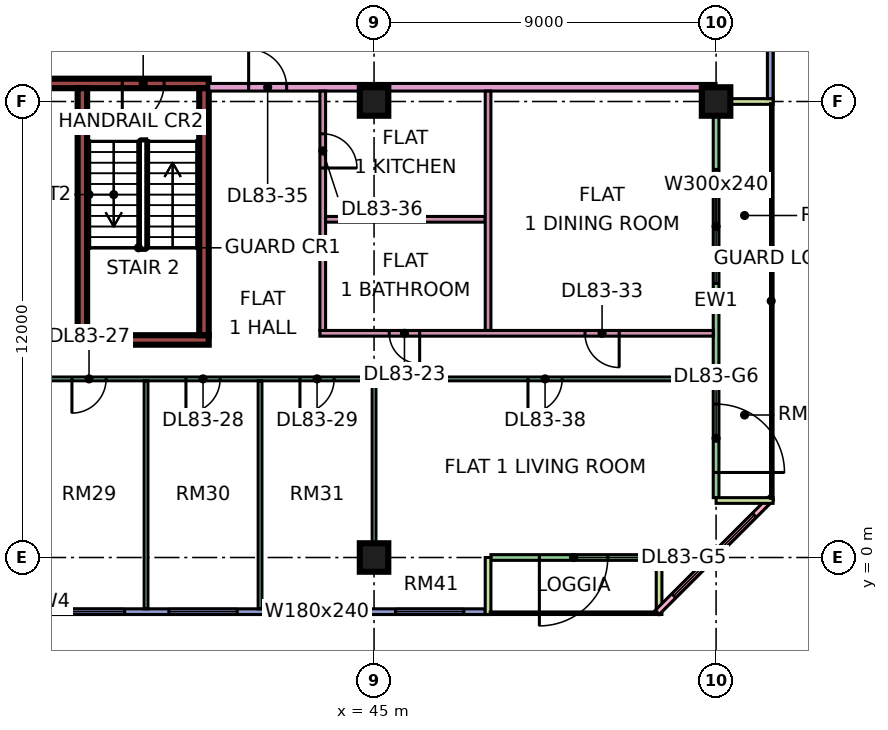
"""IFC4 building model, lengths in metres.
Left out: names, types, materials, properties, quantities, classifications, styles, units other than length and angle.
Written with IfcOpenShell. Run it as: python <this file> out.ifc"""

import sys

from ifc_helpers import new_model, si_unit, direction, frame, frame_2d, origin, origin_2d, place, context, subcontext, project, spatial, rectangle, extrude, element, fill, save


model = new_model("IFC4")
c1 = context("Model", 3, precision=1e-05, world=origin(), true_north=direction((0.0, 1.0)))
c2 = subcontext(c1, "Body", "Model", "MODEL_VIEW")
j1 = project(units=[si_unit("LENGTHUNIT", "METRE"), si_unit("PLANEANGLEUNIT", "RADIAN")], contexts=[c1])
p1 = place(None, origin())
s1 = spatial("IfcSite", under=j1, at=p1, CompositionType="ELEMENT")
p2 = place(p1, origin())
s2 = spatial("IfcBuilding", under=s1, at=p2, CompositionType="ELEMENT")
p3 = place(p2, frame((0.0, 0.0, 357.65)))
s3 = spatial("IfcBuildingStorey", under=s2, at=p3, CompositionType="ELEMENT", Elevation=357.65)
for number, where, z_axis, x_axis in (
    (1, (45.0, 0.0, 0.0), (0.0, 0.0, 1.0), (1.0, 0.0, 0.0)),
    (2, (45.0, 12.0, 0.0), (0.0, 0.0, 1.0), (1.0, 0.0, 0.0)),
    (3, (54.0, 12.0, 0.0), (0.0, 0.0, 1.0), (1.0, 0.0, 0.0)),
):
    element("IfcColumn", number, at=place(p3, frame(where, z_axis=z_axis, x_axis=x_axis)), inside=s3, PredefinedType="COLUMN", context=c2, shape_type="SweptSolid", body=[
        extrude(rectangle(XDim=0.75, YDim=0.75, at=origin_2d()), origin(), (0.0, 0.0, 1.0), 3.75),
    ])
p4 = place(p3, frame((37.2, 5.725, 0.0), z_axis=(0.0, 0.0, 1.0), x_axis=(1.0, 0.0, 0.0)))
e4 = element("IfcWall", 4, at=p4, inside=s3, PredefinedType="SHEAR", context=c2, shape_type="SweptSolid", body=[
    extrude(rectangle(XDim=3.45, YDim=0.25, at=frame_2d((1.725, 0.0))), origin(), (0.0, 0.0, 1.0), 3.75),
])
p5 = place(p3, frame((36.375, 12.475, 0.0), z_axis=(0.0, 0.0, 1.0), x_axis=(1.0, 0.0, 0.0)))
e5 = element("IfcWall", 5, at=p5, inside=s3, PredefinedType="SHEAR", context=c2, shape_type="SweptSolid", body=[
    extrude(rectangle(XDim=4.275, YDim=0.25, at=frame_2d((2.137, 0.0))), origin(), (0.0, 0.0, 1.0), 3.75),
])
p6 = place(p5, frame((2.0, 0.0, 0.0)))
e6 = element("IfcOpeningElement", 6, at=p6, cuts=e5, PredefinedType="OPENING", context=c2, shape_type="SweptSolid", body=[
    extrude(rectangle(XDim=1.1, YDim=2.2, at=frame_2d((0.55, 1.1))), frame((0.0, 0.135, 0.0), z_axis=(0.0, -1.0, 0.0), x_axis=(1.0, 0.0, 0.0)), (0.0, 0.0, 1.0), 0.27),
])
for number, where, z_axis, x_axis in (
    (7, (37.325, 5.85, 0.0), (0.0, 0.0, 1.0), (0.0, 1.0, 0.0)),
    (8, (40.525, 5.85, 0.0), (0.0, 0.0, 1.0), (0.0, 1.0, 0.0)),
):
    element("IfcWall", number, at=place(p3, frame(where, z_axis=z_axis, x_axis=x_axis)), inside=s3, PredefinedType="SHEAR", context=c2, shape_type="SweptSolid", body=[
        extrude(rectangle(XDim=6.5, YDim=0.25, at=frame_2d((3.25, 0.0))), origin(), (0.0, 0.0, 1.0), 3.75),
    ])
p7 = place(p3, frame((36.075, -1.425, 0.0), z_axis=(0.0, 0.0, 1.0), x_axis=(1.0, 0.0, 0.0)))
e9 = element("IfcWall", 9, at=p7, inside=s3, PredefinedType="SOLIDWALL", context=c2, shape_type="SweptSolid", body=[
    extrude(rectangle(XDim=11.85, YDim=0.15, at=frame_2d((5.925, 0.0))), origin(), (0.0, 0.0, 1.0), 3.35),
])
p8 = place(p7, frame((0.562, 0.0, 0.45)))
e10 = element("IfcOpeningElement", 10, at=p8, cuts=e9, PredefinedType="OPENING", context=c2, shape_type="SweptSolid", body=[
    extrude(rectangle(XDim=1.8, YDim=2.4, at=frame_2d((0.9, 1.2))), frame((0.0, 0.085, 0.0), z_axis=(0.0, -1.0, 0.0), x_axis=(1.0, 0.0, 0.0)), (0.0, 0.0, 1.0), 0.17),
])
p9 = place(p7, frame((3.525, 0.0, 0.45)))
e11 = element("IfcOpeningElement", 11, at=p9, cuts=e9, PredefinedType="OPENING", context=c2, shape_type="SweptSolid", body=[
    extrude(rectangle(XDim=1.8, YDim=2.4, at=frame_2d((0.9, 1.2))), frame((0.0, 0.085, 0.0), z_axis=(0.0, -1.0, 0.0), x_axis=(1.0, 0.0, 0.0)), (0.0, 0.0, 1.0), 0.17),
])
p10 = place(p7, frame((6.525, 0.0, 0.45)))
e12 = element("IfcOpeningElement", 12, at=p10, cuts=e9, PredefinedType="OPENING", context=c2, shape_type="SweptSolid", body=[
    extrude(rectangle(XDim=1.8, YDim=2.4, at=frame_2d((0.9, 1.2))), frame((0.0, 0.085, 0.0), z_axis=(0.0, -1.0, 0.0), x_axis=(1.0, 0.0, 0.0)), (0.0, 0.0, 1.0), 0.17),
])
p11 = place(p7, frame((9.488, 0.0, 0.45)))
e13 = element("IfcOpeningElement", 13, at=p11, cuts=e9, PredefinedType="OPENING", context=c2, shape_type="SweptSolid", body=[
    extrude(rectangle(XDim=1.8, YDim=2.4, at=frame_2d((0.9, 1.2))), frame((0.0, 0.085, 0.0), z_axis=(0.0, -1.0, 0.0), x_axis=(1.0, 0.0, 0.0)), (0.0, 0.0, 1.0), 0.17),
])
p12 = place(p3, frame((48.075, 0.0, 0.0), z_axis=(0.0, 0.0, 1.0), x_axis=(1.0, 0.0, 0.0)))
e14 = element("IfcWall", 14, at=p12, inside=s3, PredefinedType="SOLIDWALL", context=c2, shape_type="SweptSolid", body=[
    extrude(rectangle(XDim=4.35, YDim=0.15, at=frame_2d((2.175, 0.0))), origin(), (0.0, 0.0, 1.0), 3.35),
])
p13 = place(p12, frame((1.275, 0.0, 0.0)))
e15 = element("IfcOpeningElement", 15, at=p13, cuts=e14, PredefinedType="OPENING", context=c2, shape_type="SweptSolid", body=[
    extrude(rectangle(XDim=1.8, YDim=2.4, at=frame_2d((0.9, 1.2))), frame((0.0, 0.085, 0.0), z_axis=(0.0, -1.0, 0.0), x_axis=(1.0, 0.0, 0.0)), (0.0, 0.0, 1.0), 0.17),
])
for number, where, z_axis, x_axis in (
    (16, (48.0, -1.5, 0.0), (0.0, 0.0, 1.0), (0.0, 1.0, 0.0)),
    (17, (52.5, -1.5, 0.0), (0.0, 0.0, 1.0), (0.0, 1.0, 0.0)),
):
    element("IfcWall", number, at=place(p3, frame(where, z_axis=z_axis, x_axis=x_axis)), inside=s3, PredefinedType="SOLIDWALL", context=c2, shape_type="SweptSolid", body=[
        extrude(rectangle(XDim=1.5, YDim=0.15, at=frame_2d((0.75, 0.0))), origin(), (0.0, 0.0, 1.0), 3.35),
    ])
p14 = place(p3, frame((52.447, -1.447, 0.0), z_axis=(0.0, 0.0, 1.0), x_axis=(0.707106781187, 0.707106781187, 0.0)))
e18 = element("IfcWall", 18, at=p14, inside=s3, PredefinedType="SOLIDWALL", context=c2, shape_type="SweptSolid", body=[
    extrude(rectangle(XDim=4.243, YDim=0.15, at=frame_2d((2.121, 0.0))), origin(), (0.0, 0.0, 1.0), 3.35),
])
p15 = place(p14, frame((0.621, 0.0, 0.45)))
e19 = element("IfcOpeningElement", 19, at=p15, cuts=e18, PredefinedType="OPENING", context=c2, shape_type="SweptSolid", body=[
    extrude(rectangle(XDim=3.0, YDim=2.4, at=frame_2d((1.5, 1.2))), frame((0.0, 0.085, 0.0), z_axis=(0.0, -1.0, 0.0), x_axis=(1.0, 0.0, 0.0)), (0.0, 0.0, 1.0), 0.17),
])
p16 = place(p3, frame((54.0, 1.575, 0.0), z_axis=(0.0, 0.0, 1.0), x_axis=(0.0, 1.0, 0.0)))
e20 = element("IfcWall", 20, at=p16, inside=s3, PredefinedType="SOLIDWALL", context=c2, shape_type="SweptSolid", body=[
    extrude(rectangle(XDim=10.35, YDim=0.15, at=frame_2d((5.175, 0.0))), origin(), (0.0, 0.0, 1.0), 3.35),
])
p17 = place(p16, frame((0.663, 0.0, 0.0)))
e21 = element("IfcOpeningElement", 21, at=p17, cuts=e20, PredefinedType="OPENING", context=c2, shape_type="SweptSolid", body=[
    extrude(rectangle(XDim=1.8, YDim=2.4, at=frame_2d((0.9, 1.2))), frame((0.0, 0.085, 0.0), z_axis=(0.0, -1.0, 0.0), x_axis=(1.0, 0.0, 0.0)), (0.0, 0.0, 1.0), 0.17),
])
p18 = place(p16, frame((5.637, 0.0, 0.45)))
e22 = element("IfcOpeningElement", 22, at=p18, cuts=e20, PredefinedType="OPENING", context=c2, shape_type="SweptSolid", body=[
    extrude(rectangle(XDim=3.0, YDim=2.4, at=frame_2d((1.5, 1.2))), frame((0.0, 0.085, 0.0), z_axis=(0.0, -1.0, 0.0), x_axis=(1.0, 0.0, 0.0)), (0.0, 0.0, 1.0), 0.17),
])
for number, where, z_axis, x_axis in (
    (23, (55.5, 1.5, 0.0), (0.0, 0.0, 1.0), (-1.0, 0.0, 0.0)),
    (24, (55.5, 12.0, 0.0), (0.0, 0.0, 1.0), (-1.0, 0.0, 0.0)),
):
    element("IfcWall", number, at=place(p3, frame(where, z_axis=z_axis, x_axis=x_axis)), inside=s3, PredefinedType="SOLIDWALL", context=c2, shape_type="SweptSolid", body=[
        extrude(rectangle(XDim=1.5, YDim=0.15, at=frame_2d((0.75, 0.0))), origin(), (0.0, 0.0, 1.0), 3.35),
    ])
p19 = place(p3, frame((55.425, 12.075, 0.0), z_axis=(0.0, 0.0, 1.0), x_axis=(0.0, 1.0, 0.0)))
e25 = element("IfcWall", 25, at=p19, inside=s3, PredefinedType="SOLIDWALL", context=c2, shape_type="SweptSolid", body=[
    extrude(rectangle(XDim=10.425, YDim=0.15, at=frame_2d((5.212, 0.0))), origin(), (0.0, 0.0, 1.0), 3.35),
])
p20 = place(p19, frame((4.575, 0.0, 0.45)))
e26 = element("IfcOpeningElement", 26, at=p20, cuts=e25, PredefinedType="OPENING", context=c2, shape_type="SweptSolid", body=[
    extrude(rectangle(XDim=4.8, YDim=2.4, at=frame_2d((2.4, 1.2))), frame((0.0, 0.085, 0.0), z_axis=(0.0, -1.0, 0.0), x_axis=(1.0, 0.0, 0.0)), (0.0, 0.0, 1.0), 0.17),
])
p21 = place(p3, frame((33.05, 4.7, 0.0), z_axis=(0.0, 0.0, 1.0), x_axis=(1.0, 0.0, 0.0)))
e27 = element("IfcWall", 27, at=p21, inside=s3, PredefinedType="PARTITIONING", context=c2, shape_type="SweptSolid", body=[
    extrude(rectangle(XDim=20.876, YDim=0.1, at=frame_2d((10.438, 0.0))), origin(), (0.0, 0.0, 1.0), 3.35),
])
p22 = place(p21, frame((1.0, 0.0, 0.0)))
e28 = element("IfcOpeningElement", 28, at=p22, cuts=e27, PredefinedType="OPENING", context=c2, shape_type="SweptSolid", body=[
    extrude(rectangle(XDim=0.9, YDim=2.1, at=frame_2d((0.45, 1.05))), frame((0.0, 0.06, 0.0), z_axis=(0.0, -1.0, 0.0), x_axis=(1.0, 0.0, 0.0)), (0.0, 0.0, 1.0), 0.12),
])
p23 = place(p21, frame((4.0, 0.0, 0.0)))
e29 = element("IfcOpeningElement", 29, at=p23, cuts=e27, PredefinedType="OPENING", context=c2, shape_type="SweptSolid", body=[
    extrude(rectangle(XDim=0.9, YDim=2.1, at=frame_2d((0.45, 1.05))), frame((0.0, 0.06, 0.0), z_axis=(0.0, -1.0, 0.0), x_axis=(1.0, 0.0, 0.0)), (0.0, 0.0, 1.0), 0.12),
])
p24 = place(p21, frame((7.0, 0.0, 0.0)))
e30 = element("IfcOpeningElement", 30, at=p24, cuts=e27, PredefinedType="OPENING", context=c2, shape_type="SweptSolid", body=[
    extrude(rectangle(XDim=0.9, YDim=2.1, at=frame_2d((0.45, 1.05))), frame((0.0, 0.06, 0.0), z_axis=(0.0, -1.0, 0.0), x_axis=(1.0, 0.0, 0.0)), (0.0, 0.0, 1.0), 0.12),
])
p25 = place(p21, frame((10.0, 0.0, 0.0)))
e31 = element("IfcOpeningElement", 31, at=p25, cuts=e27, PredefinedType="OPENING", context=c2, shape_type="SweptSolid", body=[
    extrude(rectangle(XDim=0.9, YDim=2.1, at=frame_2d((0.45, 1.05))), frame((0.0, 0.06, 0.0), z_axis=(0.0, -1.0, 0.0), x_axis=(1.0, 0.0, 0.0)), (0.0, 0.0, 1.0), 0.12),
])
p26 = place(p21, frame((16.0, 0.0, 0.0)))
e32 = element("IfcOpeningElement", 32, at=p26, cuts=e27, PredefinedType="OPENING", context=c2, shape_type="SweptSolid", body=[
    extrude(rectangle(XDim=0.9, YDim=2.1, at=frame_2d((0.45, 1.05))), frame((0.0, 0.06, 0.0), z_axis=(0.0, -1.0, 0.0), x_axis=(1.0, 0.0, 0.0)), (0.0, 0.0, 1.0), 0.12),
])
p27 = place(p3, frame((39.0, -1.351, 0.0), z_axis=(0.0, 0.0, 1.0), x_axis=(0.0, 1.0, 0.0)))
e33 = element("IfcWall", 33, at=p27, inside=s3, PredefinedType="PARTITIONING", context=c2, shape_type="SweptSolid", body=[
    extrude(rectangle(XDim=6.001, YDim=0.1, at=frame_2d((3.0, 0.0))), origin(), (0.0, 0.0, 1.0), 3.35),
])
p28 = place(p3, frame((40.65, 12.375, 0.0), z_axis=(0.0, 0.0, 1.0), x_axis=(1.0, 0.0, 0.0)))
e34 = element("IfcWall", 34, at=p28, inside=s3, PredefinedType="PARTITIONING", context=c2, shape_type="SweptSolid", body=[
    extrude(rectangle(XDim=13.35, YDim=0.2, at=frame_2d((6.675, 0.0))), origin(), (0.0, 0.0, 1.0), 3.35),
])
p29 = place(p28, frame((1.05, 0.0, 0.0)))
e35 = element("IfcOpeningElement", 35, at=p29, cuts=e34, PredefinedType="OPENING", context=c2, shape_type="SweptSolid", body=[
    extrude(rectangle(XDim=1.0, YDim=2.1, at=frame_2d((0.5, 1.05))), frame((0.0, 0.11, 0.0), z_axis=(0.0, -1.0, 0.0), x_axis=(1.0, 0.0, 0.0)), (0.0, 0.0, 1.0), 0.22),
])
p30 = place(p3, frame((42.0, -1.351, 0.0), z_axis=(0.0, 0.0, 1.0), x_axis=(0.0, 1.0, 0.0)))
e36 = element("IfcWall", 36, at=p30, inside=s3, PredefinedType="PARTITIONING", context=c2, shape_type="SweptSolid", body=[
    extrude(rectangle(XDim=6.001, YDim=0.1, at=frame_2d((3.0, 0.0))), origin(), (0.0, 0.0, 1.0), 3.35),
])
p31 = place(p3, frame((43.575, 5.9, 0.0), z_axis=(0.0, 0.0, 1.0), x_axis=(1.0, 0.0, 0.0)))
e37 = element("IfcWall", 37, at=p31, inside=s3, PredefinedType="PARTITIONING", context=c2, shape_type="SweptSolid", body=[
    extrude(rectangle(XDim=10.351, YDim=0.15, at=frame_2d((5.176, 0.0))), origin(), (0.0, 0.0, 1.0), 3.35),
])
p32 = place(p31, frame((1.825, 0.0, 0.0)))
e38 = element("IfcOpeningElement", 38, at=p32, cuts=e37, PredefinedType="OPENING", context=c2, shape_type="SweptSolid", body=[
    extrude(rectangle(XDim=0.8, YDim=2.1, at=frame_2d((0.4, 1.05))), frame((0.0, 0.085, 0.0), z_axis=(0.0, -1.0, 0.0), x_axis=(1.0, 0.0, 0.0)), (0.0, 0.0, 1.0), 0.17),
])
p33 = place(p31, frame((6.975, 0.0, 0.0)))
e39 = element("IfcOpeningElement", 39, at=p33, cuts=e37, PredefinedType="OPENING", context=c2, shape_type="SweptSolid", body=[
    extrude(rectangle(XDim=0.9, YDim=2.1, at=frame_2d((0.45, 1.05))), frame((0.0, 0.085, 0.0), z_axis=(0.0, -1.0, 0.0), x_axis=(1.0, 0.0, 0.0)), (0.0, 0.0, 1.0), 0.17),
])
p34 = place(p3, frame((43.65, 5.975, 0.0), z_axis=(0.0, 0.0, 1.0), x_axis=(0.0, 1.0, 0.0)))
e40 = element("IfcWall", 40, at=p34, inside=s3, PredefinedType="PARTITIONING", context=c2, shape_type="SweptSolid", body=[
    extrude(rectangle(XDim=6.3, YDim=0.15, at=frame_2d((3.15, 0.0))), origin(), (0.0, 0.0, 1.0), 3.35),
])
p35 = place(p34, frame((4.275, 0.0, 0.0)))
e41 = element("IfcOpeningElement", 41, at=p35, cuts=e40, PredefinedType="OPENING", context=c2, shape_type="SweptSolid", body=[
    extrude(rectangle(XDim=0.9, YDim=2.1, at=frame_2d((0.45, 1.05))), frame((0.0, 0.085, 0.0), z_axis=(0.0, -1.0, 0.0), x_axis=(1.0, 0.0, 0.0)), (0.0, 0.0, 1.0), 0.17),
])
p36 = place(p3, frame((43.725, 8.9, 0.0), z_axis=(0.0, 0.0, 1.0), x_axis=(1.0, 0.0, 0.0)))
e42 = element("IfcWall", 42, at=p36, inside=s3, PredefinedType="PARTITIONING", context=c2, shape_type="SweptSolid", body=[
    extrude(rectangle(XDim=4.2, YDim=0.15, at=frame_2d((2.1, 0.0))), origin(), (0.0, 0.0, 1.0), 3.35),
])
p37 = place(p3, frame((45.0, 0.0, 0.0), z_axis=(0.0, 0.0, 1.0), x_axis=(0.0, 1.0, 0.0)))
e43 = element("IfcWall", 43, at=p37, inside=s3, PredefinedType="PARTITIONING", context=c2, shape_type="SweptSolid", body=[
    extrude(rectangle(XDim=4.65, YDim=0.1, at=frame_2d((2.325, 0.0))), origin(), (0.0, 0.0, 1.0), 3.35),
])
p38 = place(p3, frame((48.0, 5.975, 0.0), z_axis=(0.0, 0.0, 1.0), x_axis=(0.0, 1.0, 0.0)))
e44 = element("IfcWall", 44, at=p38, inside=s3, PredefinedType="PARTITIONING", context=c2, shape_type="SweptSolid", body=[
    extrude(rectangle(XDim=6.3, YDim=0.15, at=frame_2d((3.15, 0.0))), origin(), (0.0, 0.0, 1.0), 3.35),
])
p39 = place(p8, origin())
e45 = element("IfcWindow", 45, at=p39, inside=s3, PartitioningType="SINGLE_PANEL", PredefinedType="WINDOW", context=c2, shape_type="SweptSolid", body=[
    extrude(rectangle(XDim=1.8, YDim=2.4, at=frame_2d((0.9, 1.2))), frame((0.0, 0.03, 0.0), z_axis=(0.0, -1.0, 0.0), x_axis=(1.0, 0.0, 0.0)), (0.0, 0.0, 1.0), 0.06),
])
fill(e10, e45)
p40 = place(p9, origin())
e46 = element("IfcWindow", 46, at=p40, inside=s3, PartitioningType="SINGLE_PANEL", PredefinedType="WINDOW", context=c2, shape_type="SweptSolid", body=[
    extrude(rectangle(XDim=1.8, YDim=2.4, at=frame_2d((0.9, 1.2))), frame((0.0, 0.03, 0.0), z_axis=(0.0, -1.0, 0.0), x_axis=(1.0, 0.0, 0.0)), (0.0, 0.0, 1.0), 0.06),
])
fill(e11, e46)
p41 = place(p10, origin())
e47 = element("IfcWindow", 47, at=p41, inside=s3, PartitioningType="SINGLE_PANEL", PredefinedType="WINDOW", context=c2, shape_type="SweptSolid", body=[
    extrude(rectangle(XDim=1.8, YDim=2.4, at=frame_2d((0.9, 1.2))), frame((0.0, 0.03, 0.0), z_axis=(0.0, -1.0, 0.0), x_axis=(1.0, 0.0, 0.0)), (0.0, 0.0, 1.0), 0.06),
])
fill(e12, e47)
p42 = place(p11, origin())
e48 = element("IfcWindow", 48, at=p42, inside=s3, PartitioningType="SINGLE_PANEL", PredefinedType="WINDOW", context=c2, shape_type="SweptSolid", body=[
    extrude(rectangle(XDim=1.8, YDim=2.4, at=frame_2d((0.9, 1.2))), frame((0.0, 0.03, 0.0), z_axis=(0.0, -1.0, 0.0), x_axis=(1.0, 0.0, 0.0)), (0.0, 0.0, 1.0), 0.06),
])
fill(e13, e48)
p43 = place(p13, frame((1.8, 0.0, 0.0), z_axis=(0.0, 0.0, 1.0), x_axis=(-1.0, 0.0, 0.0)))
e49 = element("IfcDoor", 49, at=p43, inside=s3, OperationType="DOUBLE_DOOR_SINGLE_SWING", PredefinedType="DOOR", context=c2, shape_type="SweptSolid", body=[
    extrude(rectangle(XDim=1.8, YDim=2.4, at=frame_2d((0.9, 1.2))), frame((0.0, 0.025, 0.0), z_axis=(0.0, -1.0, 0.0), x_axis=(1.0, 0.0, 0.0)), (0.0, 0.0, 1.0), 0.05),
])
fill(e15, e49)
p44 = place(p15, origin())
e50 = element("IfcWindow", 50, at=p44, inside=s3, PartitioningType="SINGLE_PANEL", PredefinedType="WINDOW", context=c2, shape_type="SweptSolid", body=[
    extrude(rectangle(XDim=3.0, YDim=2.4, at=frame_2d((1.5, 1.2))), frame((0.0, 0.03, 0.0), z_axis=(0.0, -1.0, 0.0), x_axis=(1.0, 0.0, 0.0)), (0.0, 0.0, 1.0), 0.06),
])
fill(e19, e50)
p45 = place(p17, frame((1.8, 0.0, 0.0), z_axis=(0.0, 0.0, 1.0), x_axis=(-1.0, 0.0, 0.0)))
e51 = element("IfcDoor", 51, at=p45, inside=s3, OperationType="DOUBLE_DOOR_SINGLE_SWING", PredefinedType="DOOR", context=c2, shape_type="SweptSolid", body=[
    extrude(rectangle(XDim=1.8, YDim=2.4, at=frame_2d((0.9, 1.2))), frame((0.0, 0.025, 0.0), z_axis=(0.0, -1.0, 0.0), x_axis=(1.0, 0.0, 0.0)), (0.0, 0.0, 1.0), 0.05),
])
fill(e21, e51)
p46 = place(p18, origin())
e52 = element("IfcWindow", 52, at=p46, inside=s3, PartitioningType="SINGLE_PANEL", PredefinedType="WINDOW", context=c2, shape_type="SweptSolid", body=[
    extrude(rectangle(XDim=3.0, YDim=2.4, at=frame_2d((1.5, 1.2))), frame((0.0, 0.03, 0.0), z_axis=(0.0, -1.0, 0.0), x_axis=(1.0, 0.0, 0.0)), (0.0, 0.0, 1.0), 0.06),
])
fill(e22, e52)
p47 = place(p6, frame((1.1, 0.0, 0.0), z_axis=(0.0, 0.0, 1.0), x_axis=(-1.0, 0.0, 0.0)))
e53 = element("IfcDoor", 53, at=p47, inside=s3, OperationType="SINGLE_SWING_LEFT", PredefinedType="DOOR", context=c2, shape_type="SweptSolid", body=[
    extrude(rectangle(XDim=1.1, YDim=2.2, at=frame_2d((0.55, 1.1))), frame((0.0, 0.025, 0.0), z_axis=(0.0, -1.0, 0.0), x_axis=(1.0, 0.0, 0.0)), (0.0, 0.0, 1.0), 0.05),
])
fill(e6, e53)
p48 = place(p32, origin())
e54 = element("IfcDoor", 54, at=p48, inside=s3, OperationType="SINGLE_SWING_RIGHT", PredefinedType="DOOR", context=c2, shape_type="SweptSolid", body=[
    extrude(rectangle(XDim=0.8, YDim=2.1, at=frame_2d((0.4, 1.05))), frame((0.0, 0.025, 0.0), z_axis=(0.0, -1.0, 0.0), x_axis=(1.0, 0.0, 0.0)), (0.0, 0.0, 1.0), 0.05),
])
fill(e38, e54)
p49 = place(p23, frame((0.9, 0.0, 0.0), z_axis=(0.0, 0.0, 1.0), x_axis=(-1.0, 0.0, 0.0)))
e55 = element("IfcDoor", 55, at=p49, inside=s3, OperationType="SINGLE_SWING_LEFT", PredefinedType="DOOR", context=c2, shape_type="SweptSolid", body=[
    extrude(rectangle(XDim=0.9, YDim=2.1, at=frame_2d((0.45, 1.05))), frame((0.0, 0.025, 0.0), z_axis=(0.0, -1.0, 0.0), x_axis=(1.0, 0.0, 0.0)), (0.0, 0.0, 1.0), 0.05),
])
fill(e29, e55)
p50 = place(p24, frame((0.9, 0.0, 0.0), z_axis=(0.0, 0.0, 1.0), x_axis=(-1.0, 0.0, 0.0)))
e56 = element("IfcDoor", 56, at=p50, inside=s3, OperationType="SINGLE_SWING_LEFT", PredefinedType="DOOR", context=c2, shape_type="SweptSolid", body=[
    extrude(rectangle(XDim=0.9, YDim=2.1, at=frame_2d((0.45, 1.05))), frame((0.0, 0.025, 0.0), z_axis=(0.0, -1.0, 0.0), x_axis=(1.0, 0.0, 0.0)), (0.0, 0.0, 1.0), 0.05),
])
fill(e30, e56)
p51 = place(p25, frame((0.9, 0.0, 0.0), z_axis=(0.0, 0.0, 1.0), x_axis=(-1.0, 0.0, 0.0)))
e57 = element("IfcDoor", 57, at=p51, inside=s3, OperationType="SINGLE_SWING_LEFT", PredefinedType="DOOR", context=c2, shape_type="SweptSolid", body=[
    extrude(rectangle(XDim=0.9, YDim=2.1, at=frame_2d((0.45, 1.05))), frame((0.0, 0.025, 0.0), z_axis=(0.0, -1.0, 0.0), x_axis=(1.0, 0.0, 0.0)), (0.0, 0.0, 1.0), 0.05),
])
fill(e31, e57)
p52 = place(p33, origin())
e58 = element("IfcDoor", 58, at=p52, inside=s3, OperationType="SINGLE_SWING_RIGHT", PredefinedType="DOOR", context=c2, shape_type="SweptSolid", body=[
    extrude(rectangle(XDim=0.9, YDim=2.1, at=frame_2d((0.45, 1.05))), frame((0.0, 0.025, 0.0), z_axis=(0.0, -1.0, 0.0), x_axis=(1.0, 0.0, 0.0)), (0.0, 0.0, 1.0), 0.05),
])
fill(e39, e58)
p53 = place(p29, origin())
e59 = element("IfcDoor", 59, at=p53, inside=s3, OperationType="SINGLE_SWING_LEFT", PredefinedType="DOOR", context=c2, shape_type="SweptSolid", body=[
    extrude(rectangle(XDim=1.0, YDim=2.1, at=frame_2d((0.5, 1.05))), frame((0.0, 0.025, 0.0), z_axis=(0.0, -1.0, 0.0), x_axis=(1.0, 0.0, 0.0)), (0.0, 0.0, 1.0), 0.05),
])
fill(e35, e59)
p54 = place(p35, frame((0.9, 0.0, 0.0), z_axis=(0.0, 0.0, 1.0), x_axis=(-1.0, 0.0, 0.0)))
e60 = element("IfcDoor", 60, at=p54, inside=s3, OperationType="SINGLE_SWING_LEFT", PredefinedType="DOOR", context=c2, shape_type="SweptSolid", body=[
    extrude(rectangle(XDim=0.9, YDim=2.1, at=frame_2d((0.45, 1.05))), frame((0.0, 0.025, 0.0), z_axis=(0.0, -1.0, 0.0), x_axis=(1.0, 0.0, 0.0)), (0.0, 0.0, 1.0), 0.05),
])
fill(e41, e60)
p55 = place(p26, frame((0.9, 0.0, 0.0), z_axis=(0.0, 0.0, 1.0), x_axis=(-1.0, 0.0, 0.0)))
e61 = element("IfcDoor", 61, at=p55, inside=s3, OperationType="SINGLE_SWING_LEFT", PredefinedType="DOOR", context=c2, shape_type="SweptSolid", body=[
    extrude(rectangle(XDim=0.9, YDim=2.1, at=frame_2d((0.45, 1.05))), frame((0.0, 0.025, 0.0), z_axis=(0.0, -1.0, 0.0), x_axis=(1.0, 0.0, 0.0)), (0.0, 0.0, 1.0), 0.05),
])
fill(e32, e61)
save(model, sys.argv[1])
